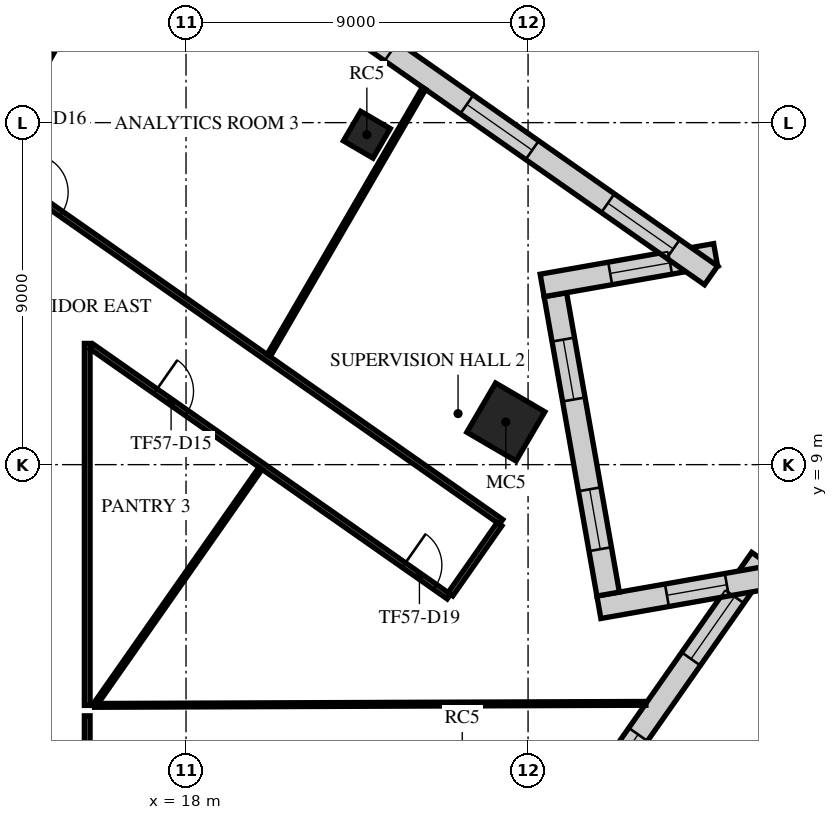
"""IFC4 building model, lengths in metres.
Left out: names, types, materials, properties, quantities, classifications, styles, units other than length and angle.
Written with IfcOpenShell. Run it as: python <this file> out.ifc"""

import sys

from ifc_helpers import new_model, si_unit, direction, frame, frame_2d, origin, origin_2d, place, context, subcontext, project, spatial, rectangle, extrude, element, fill, save


model = new_model("IFC4")
c1 = context("Model", 3, precision=1e-05, world=origin(), true_north=direction((0.0, 1.0)))
c2 = subcontext(c1, "Body", "Model", "MODEL_VIEW")
j1 = project(units=[si_unit("LENGTHUNIT", "METRE"), si_unit("PLANEANGLEUNIT", "RADIAN")], contexts=[c1])
p1 = place(None, origin())
s1 = spatial("IfcSite", under=j1, at=p1, CompositionType="ELEMENT")
p2 = place(p1, origin())
s2 = spatial("IfcBuilding", under=s1, at=p2, CompositionType="ELEMENT")
p3 = place(p2, frame((0.0, 0.0, 246.9)))
s3 = spatial("IfcBuildingStorey", under=s2, at=p3, CompositionType="ELEMENT", Elevation=246.9)
p4 = place(p3, frame((26.415, 10.122, 0.0), z_axis=(0.0, 0.0, 1.0), x_axis=(0.504643651291, 0.863327739165, 0.0)))
e1 = element("IfcColumn", 1, at=p4, inside=s3, PredefinedType="COLUMN", context=c2, shape_type="SweptSolid", body=[
    extrude(rectangle(XDim=1.5, YDim=1.5, at=origin_2d()), origin(), (0.0, 0.0, 1.0), 4.0),
])
p5 = place(p3, frame((22.758, 17.682, 0.0), z_axis=(0.0, 0.0, 1.0), x_axis=(0.504643651291, 0.863327739165, 0.0)))
e2 = element("IfcColumn", 2, at=p5, inside=s3, PredefinedType="COLUMN", context=c2, shape_type="SweptSolid", body=[
    extrude(rectangle(XDim=0.9, YDim=0.9, at=origin_2d()), origin(), (0.0, 0.0, 1.0), 4.0),
])
p6 = place(p3, frame((5.206, -33.362, 0.0), z_axis=(0.0, 0.0, 1.0), x_axis=(0.573577438409, 0.81915134264, 0.0)))
e3 = element("IfcWall", 3, at=p6, inside=s3, PredefinedType="STANDARD", context=c2, shape_type="SweptSolid", body=[
    extrude(rectangle(XDim=48.686, YDim=0.6, at=frame_2d((24.343, 0.0))), origin(), (0.0, 0.0, 1.0), 3.64),
])
p7 = place(p6, frame((1.213, 0.0, 0.9)))
e4 = element("IfcOpeningElement", 4, at=p7, cuts=e3, PredefinedType="OPENING", context=c2, shape_type="SweptSolid", body=[
    extrude(rectangle(XDim=2.0, YDim=2.1, at=frame_2d((1.0, 1.05))), frame((0.0, 0.31, 0.0), z_axis=(0.0, -1.0, 0.0), x_axis=(1.0, 0.0, 0.0)), (0.0, 0.0, 1.0), 0.62),
])
p8 = place(p6, frame((5.639, 0.0, 0.9)))
e5 = element("IfcOpeningElement", 5, at=p8, cuts=e3, PredefinedType="OPENING", context=c2, shape_type="SweptSolid", body=[
    extrude(rectangle(XDim=2.0, YDim=2.1, at=frame_2d((1.0, 1.05))), frame((0.0, 0.31, 0.0), z_axis=(0.0, -1.0, 0.0), x_axis=(1.0, 0.0, 0.0)), (0.0, 0.0, 1.0), 0.62),
])
p9 = place(p6, frame((10.065, 0.0, 0.9)))
e6 = element("IfcOpeningElement", 6, at=p9, cuts=e3, PredefinedType="OPENING", context=c2, shape_type="SweptSolid", body=[
    extrude(rectangle(XDim=2.0, YDim=2.1, at=frame_2d((1.0, 1.05))), frame((0.0, 0.31, 0.0), z_axis=(0.0, -1.0, 0.0), x_axis=(1.0, 0.0, 0.0)), (0.0, 0.0, 1.0), 0.62),
])
p10 = place(p6, frame((14.491, 0.0, 0.9)))
e7 = element("IfcOpeningElement", 7, at=p10, cuts=e3, PredefinedType="OPENING", context=c2, shape_type="SweptSolid", body=[
    extrude(rectangle(XDim=2.0, YDim=2.1, at=frame_2d((1.0, 1.05))), frame((0.0, 0.31, 0.0), z_axis=(0.0, -1.0, 0.0), x_axis=(1.0, 0.0, 0.0)), (0.0, 0.0, 1.0), 0.62),
])
p11 = place(p6, frame((18.917, 0.0, 0.9)))
e8 = element("IfcOpeningElement", 8, at=p11, cuts=e3, PredefinedType="OPENING", context=c2, shape_type="SweptSolid", body=[
    extrude(rectangle(XDim=2.0, YDim=2.1, at=frame_2d((1.0, 1.05))), frame((0.0, 0.31, 0.0), z_axis=(0.0, -1.0, 0.0), x_axis=(1.0, 0.0, 0.0)), (0.0, 0.0, 1.0), 0.62),
])
p12 = place(p6, frame((23.343, 0.0, 0.9)))
e9 = element("IfcOpeningElement", 9, at=p12, cuts=e3, PredefinedType="OPENING", context=c2, shape_type="SweptSolid", body=[
    extrude(rectangle(XDim=2.0, YDim=2.1, at=frame_2d((1.0, 1.05))), frame((0.0, 0.31, 0.0), z_axis=(0.0, -1.0, 0.0), x_axis=(1.0, 0.0, 0.0)), (0.0, 0.0, 1.0), 0.62),
])
p13 = place(p6, frame((27.769, 0.0, 0.9)))
e10 = element("IfcOpeningElement", 10, at=p13, cuts=e3, PredefinedType="OPENING", context=c2, shape_type="SweptSolid", body=[
    extrude(rectangle(XDim=2.0, YDim=2.1, at=frame_2d((1.0, 1.05))), frame((0.0, 0.31, 0.0), z_axis=(0.0, -1.0, 0.0), x_axis=(1.0, 0.0, 0.0)), (0.0, 0.0, 1.0), 0.62),
])
p14 = place(p6, frame((32.195, 0.0, 0.9)))
e11 = element("IfcOpeningElement", 11, at=p14, cuts=e3, PredefinedType="OPENING", context=c2, shape_type="SweptSolid", body=[
    extrude(rectangle(XDim=2.0, YDim=2.1, at=frame_2d((1.0, 1.05))), frame((0.0, 0.31, 0.0), z_axis=(0.0, -1.0, 0.0), x_axis=(1.0, 0.0, 0.0)), (0.0, 0.0, 1.0), 0.62),
])
p15 = place(p6, frame((36.621, 0.0, 0.9)))
e12 = element("IfcOpeningElement", 12, at=p15, cuts=e3, PredefinedType="OPENING", context=c2, shape_type="SweptSolid", body=[
    extrude(rectangle(XDim=2.0, YDim=2.1, at=frame_2d((1.0, 1.05))), frame((0.0, 0.31, 0.0), z_axis=(0.0, -1.0, 0.0), x_axis=(1.0, 0.0, 0.0)), (0.0, 0.0, 1.0), 0.62),
])
p16 = place(p6, frame((41.047, 0.0, 0.9)))
e13 = element("IfcOpeningElement", 13, at=p16, cuts=e3, PredefinedType="OPENING", context=c2, shape_type="SweptSolid", body=[
    extrude(rectangle(XDim=2.0, YDim=2.1, at=frame_2d((1.0, 1.05))), frame((0.0, 0.31, 0.0), z_axis=(0.0, -1.0, 0.0), x_axis=(1.0, 0.0, 0.0)), (0.0, 0.0, 1.0), 0.62),
])
p17 = place(p6, frame((45.473, 0.0, 0.9)))
e14 = element("IfcOpeningElement", 14, at=p17, cuts=e3, PredefinedType="OPENING", context=c2, shape_type="SweptSolid", body=[
    extrude(rectangle(XDim=2.0, YDim=2.1, at=frame_2d((1.0, 1.05))), frame((0.0, 0.31, 0.0), z_axis=(0.0, -1.0, 0.0), x_axis=(1.0, 0.0, 0.0)), (0.0, 0.0, 1.0), 0.62),
])
p18 = place(p3, frame((33.429, 6.052, 0.0), z_axis=(0.0, 0.0, 1.0), x_axis=(-0.984808997794, -0.173641118013, 0.0)))
e15 = element("IfcWall", 15, at=p18, inside=s3, PredefinedType="STANDARD", context=c2, shape_type="SweptSolid", body=[
    extrude(rectangle(XDim=4.635, YDim=0.6, at=frame_2d((2.318, 0.0))), origin(), (0.0, 0.0, 1.0), 3.64),
])
p19 = place(p18, frame((1.218, 0.0, 0.9)))
e16 = element("IfcOpeningElement", 16, at=p19, cuts=e15, PredefinedType="OPENING", context=c2, shape_type="SweptSolid", body=[
    extrude(rectangle(XDim=1.6, YDim=2.1, at=frame_2d((0.8, 1.05))), frame((0.0, 0.31, 0.0), z_axis=(0.0, -1.0, 0.0), x_axis=(1.0, 0.0, 0.0)), (0.0, 0.0, 1.0), 0.62),
])
p20 = place(p3, frame((29.107, 5.594, 0.0), z_axis=(0.0, 0.0, 1.0), x_axis=(-0.173640837858, 0.98480904719, 0.0)))
e17 = element("IfcWall", 17, at=p20, inside=s3, PredefinedType="STANDARD", context=c2, shape_type="SweptSolid", body=[
    extrude(rectangle(XDim=8.0, YDim=0.6, at=frame_2d((4.0, 0.0))), origin(), (0.0, 0.0, 1.0), 3.64),
])
p21 = place(p20, frame((1.2, 0.0, 0.9)))
e18 = element("IfcOpeningElement", 18, at=p21, cuts=e17, PredefinedType="OPENING", context=c2, shape_type="SweptSolid", body=[
    extrude(rectangle(XDim=1.6, YDim=2.1, at=frame_2d((0.8, 1.05))), frame((0.0, 0.31, 0.0), z_axis=(0.0, -1.0, 0.0), x_axis=(1.0, 0.0, 0.0)), (0.0, 0.0, 1.0), 0.62),
])
p22 = place(p20, frame((5.2, 0.0, 0.9)))
e19 = element("IfcOpeningElement", 19, at=p22, cuts=e17, PredefinedType="OPENING", context=c2, shape_type="SweptSolid", body=[
    extrude(rectangle(XDim=1.6, YDim=2.1, at=frame_2d((0.8, 1.05))), frame((0.0, 0.31, 0.0), z_axis=(0.0, -1.0, 0.0), x_axis=(1.0, 0.0, 0.0)), (0.0, 0.0, 1.0), 0.62),
])
p23 = place(p3, frame((27.37, 13.716, 0.0), z_axis=(0.0, 0.0, 1.0), x_axis=(0.984799990421, 0.173692195754, 0.0)))
e20 = element("IfcWall", 20, at=p23, inside=s3, PredefinedType="STANDARD", context=c2, shape_type="SweptSolid", body=[
    extrude(rectangle(XDim=4.636, YDim=0.6, at=frame_2d((2.318, 0.0))), origin(), (0.0, 0.0, 1.0), 3.64),
])
p24 = place(p23, frame((1.818, 0.0, 0.9)))
e21 = element("IfcOpeningElement", 21, at=p24, cuts=e20, PredefinedType="OPENING", context=c2, shape_type="SweptSolid", body=[
    extrude(rectangle(XDim=1.6, YDim=2.1, at=frame_2d((0.8, 1.05))), frame((0.0, 0.31, 0.0), z_axis=(0.0, -1.0, 0.0), x_axis=(1.0, 0.0, 0.0)), (0.0, 0.0, 1.0), 0.62),
])
p25 = place(p3, frame((31.815, 13.98, 0.0), z_axis=(0.0, 0.0, 1.0), x_axis=(-0.819152162902, 0.573576266955, 0.0)))
e22 = element("IfcWall", 22, at=p25, inside=s3, PredefinedType="STANDARD", context=c2, shape_type="SweptSolid", body=[
    extrude(rectangle(XDim=36.243, YDim=0.6, at=frame_2d((18.122, 0.0))), origin(), (0.0, 0.0, 1.0), 3.64),
])
p26 = place(p25, frame((1.215, 0.0, 0.9)))
e23 = element("IfcOpeningElement", 23, at=p26, cuts=e22, PredefinedType="OPENING", context=c2, shape_type="SweptSolid", body=[
    extrude(rectangle(XDim=2.1, YDim=2.1, at=frame_2d((1.05, 1.05))), frame((0.0, 0.31, 0.0), z_axis=(0.0, -1.0, 0.0), x_axis=(1.0, 0.0, 0.0)), (0.0, 0.0, 1.0), 0.62),
])
p27 = place(p25, frame((5.746, 0.0, 0.9)))
e24 = element("IfcOpeningElement", 24, at=p27, cuts=e22, PredefinedType="OPENING", context=c2, shape_type="SweptSolid", body=[
    extrude(rectangle(XDim=2.1, YDim=2.1, at=frame_2d((1.05, 1.05))), frame((0.0, 0.31, 0.0), z_axis=(0.0, -1.0, 0.0), x_axis=(1.0, 0.0, 0.0)), (0.0, 0.0, 1.0), 0.62),
])
p28 = place(p25, frame((10.276, 0.0, 0.9)))
e25 = element("IfcOpeningElement", 25, at=p28, cuts=e22, PredefinedType="OPENING", context=c2, shape_type="SweptSolid", body=[
    extrude(rectangle(XDim=2.1, YDim=2.1, at=frame_2d((1.05, 1.05))), frame((0.0, 0.31, 0.0), z_axis=(0.0, -1.0, 0.0), x_axis=(1.0, 0.0, 0.0)), (0.0, 0.0, 1.0), 0.62),
])
p29 = place(p25, frame((14.806, 0.0, 0.9)))
e26 = element("IfcOpeningElement", 26, at=p29, cuts=e22, PredefinedType="OPENING", context=c2, shape_type="SweptSolid", body=[
    extrude(rectangle(XDim=2.1, YDim=2.1, at=frame_2d((1.05, 1.05))), frame((0.0, 0.31, 0.0), z_axis=(0.0, -1.0, 0.0), x_axis=(1.0, 0.0, 0.0)), (0.0, 0.0, 1.0), 0.62),
])
p30 = place(p25, frame((19.337, 0.0, 0.9)))
e27 = element("IfcOpeningElement", 27, at=p30, cuts=e22, PredefinedType="OPENING", context=c2, shape_type="SweptSolid", body=[
    extrude(rectangle(XDim=2.1, YDim=2.1, at=frame_2d((1.05, 1.05))), frame((0.0, 0.31, 0.0), z_axis=(0.0, -1.0, 0.0), x_axis=(1.0, 0.0, 0.0)), (0.0, 0.0, 1.0), 0.62),
])
p31 = place(p25, frame((23.867, 0.0, 0.9)))
e28 = element("IfcOpeningElement", 28, at=p31, cuts=e22, PredefinedType="OPENING", context=c2, shape_type="SweptSolid", body=[
    extrude(rectangle(XDim=2.1, YDim=2.1, at=frame_2d((1.05, 1.05))), frame((0.0, 0.31, 0.0), z_axis=(0.0, -1.0, 0.0), x_axis=(1.0, 0.0, 0.0)), (0.0, 0.0, 1.0), 0.62),
])
p32 = place(p25, frame((28.398, 0.0, 0.9)))
e29 = element("IfcOpeningElement", 29, at=p32, cuts=e22, PredefinedType="OPENING", context=c2, shape_type="SweptSolid", body=[
    extrude(rectangle(XDim=2.1, YDim=2.1, at=frame_2d((1.05, 1.05))), frame((0.0, 0.31, 0.0), z_axis=(0.0, -1.0, 0.0), x_axis=(1.0, 0.0, 0.0)), (0.0, 0.0, 1.0), 0.62),
])
p33 = place(p25, frame((32.928, 0.0, 0.9)))
e30 = element("IfcOpeningElement", 30, at=p33, cuts=e22, PredefinedType="OPENING", context=c2, shape_type="SweptSolid", body=[
    extrude(rectangle(XDim=2.1, YDim=2.1, at=frame_2d((1.05, 1.05))), frame((0.0, 0.31, 0.0), z_axis=(0.0, -1.0, 0.0), x_axis=(1.0, 0.0, 0.0)), (0.0, 0.0, 1.0), 0.62),
])
p34 = place(p3, frame((-1.89, 27.226, 0.0), z_axis=(0.0, 0.0, 1.0), x_axis=(0.819163235761, -0.573560452941, 0.0)))
e31 = element("IfcWall", 31, at=p34, inside=s3, PredefinedType="PARTITIONING", context=c2, shape_type="SweptSolid", body=[
    extrude(rectangle(XDim=34.403, YDim=0.15, at=frame_2d((17.202, 0.0))), origin(), (0.0, 0.0, 1.0), 3.24),
])
p35 = place(p34, frame((7.427, 0.0, 0.0)))
e32 = element("IfcOpeningElement", 32, at=p35, cuts=e31, PredefinedType="OPENING", context=c2, shape_type="SweptSolid", body=[
    extrude(rectangle(XDim=1.0, YDim=2.1, at=frame_2d((0.5, 1.05))), frame((0.0, 0.085, 0.0), z_axis=(0.0, -1.0, 0.0), x_axis=(1.0, 0.0, 0.0)), (0.0, 0.0, 1.0), 0.17),
])
p36 = place(p34, frame((15.173, 0.0, 0.0)))
e33 = element("IfcOpeningElement", 33, at=p36, cuts=e31, PredefinedType="OPENING", context=c2, shape_type="SweptSolid", body=[
    extrude(rectangle(XDim=1.0, YDim=2.1, at=frame_2d((0.5, 1.05))), frame((0.0, 0.085, 0.0), z_axis=(0.0, -1.0, 0.0), x_axis=(1.0, 0.0, 0.0)), (0.0, 0.0, 1.0), 0.17),
])
p37 = place(p34, frame((19.273, 0.0, 0.0)))
e34 = element("IfcOpeningElement", 34, at=p37, cuts=e31, PredefinedType="OPENING", context=c2, shape_type="SweptSolid", body=[
    extrude(rectangle(XDim=1.0, YDim=2.1, at=frame_2d((0.5, 1.05))), frame((0.0, 0.085, 0.0), z_axis=(0.0, -1.0, 0.0), x_axis=(1.0, 0.0, 0.0)), (0.0, 0.0, 1.0), 0.17),
])
p38 = place(p3, frame((15.4, -15.325, 0.0), z_axis=(0.0, 0.0, 1.0), x_axis=(0.0, 1.0, 0.0)))
e35 = element("IfcWall", 35, at=p38, inside=s3, PredefinedType="PARTITIONING", context=c2, shape_type="SweptSolid", body=[
    extrude(rectangle(XDim=17.715, YDim=0.15, at=frame_2d((8.857, 0.0))), origin(), (0.0, 0.0, 1.0), 3.24),
])
p39 = place(p38, frame((7.812, 0.0, 0.0)))
e36 = element("IfcOpeningElement", 36, at=p39, cuts=e35, PredefinedType="OPENING", context=c2, shape_type="SweptSolid", body=[
    extrude(rectangle(XDim=1.0, YDim=2.1, at=frame_2d((0.5, 1.05))), frame((0.0, 0.085, 0.0), z_axis=(0.0, -1.0, 0.0), x_axis=(1.0, 0.0, 0.0)), (0.0, 0.0, 1.0), 0.17),
])
p40 = place(p38, frame((15.123, 0.0, 0.0)))
e37 = element("IfcOpeningElement", 37, at=p40, cuts=e35, PredefinedType="OPENING", context=c2, shape_type="SweptSolid", body=[
    extrude(rectangle(XDim=1.0, YDim=2.1, at=frame_2d((0.5, 1.05))), frame((0.0, 0.085, 0.0), z_axis=(0.0, -1.0, 0.0), x_axis=(1.0, 0.0, 0.0)), (0.0, 0.0, 1.0), 0.17),
])
p41 = place(p3, frame((15.4, 2.664, 0.0), z_axis=(0.0, 0.0, 1.0), x_axis=(0.0, 1.0, 0.0)))
e38 = element("IfcWall", 38, at=p41, inside=s3, PredefinedType="PARTITIONING", context=c2, shape_type="SweptSolid", body=[
    extrude(rectangle(XDim=9.526, YDim=0.15, at=frame_2d((4.763, 0.0))), origin(), (0.0, 0.0, 1.0), 3.24),
])
p42 = place(p3, frame((15.518, 12.107, 0.0), z_axis=(0.0, 0.0, 1.0), x_axis=(0.819171924474, -0.573548043457, 0.0)))
e39 = element("IfcWall", 39, at=p42, inside=s3, PredefinedType="PARTITIONING", context=c2, shape_type="SweptSolid", body=[
    extrude(rectangle(XDim=11.471, YDim=0.15, at=frame_2d((5.736, 0.0))), origin(), (0.0, 0.0, 1.0), 3.24),
])
p43 = place(p42, frame((2.05, 0.0, 0.0)))
e40 = element("IfcOpeningElement", 40, at=p43, cuts=e39, PredefinedType="OPENING", context=c2, shape_type="SweptSolid", body=[
    extrude(rectangle(XDim=1.0, YDim=2.1, at=frame_2d((0.5, 1.05))), frame((0.0, 0.085, 0.0), z_axis=(0.0, -1.0, 0.0), x_axis=(1.0, 0.0, 0.0)), (0.0, 0.0, 1.0), 0.17),
])
p44 = place(p42, frame((10.027, 0.0, 0.0)))
e41 = element("IfcOpeningElement", 41, at=p44, cuts=e39, PredefinedType="OPENING", context=c2, shape_type="SweptSolid", body=[
    extrude(rectangle(XDim=1.0, YDim=2.1, at=frame_2d((0.5, 1.05))), frame((0.0, 0.085, 0.0), z_axis=(0.0, -1.0, 0.0), x_axis=(1.0, 0.0, 0.0)), (0.0, 0.0, 1.0), 0.17),
])
p45 = place(p3, frame((24.958, 5.589, 0.0), z_axis=(0.0, 0.0, 1.0), x_axis=(0.573680754751, 0.819078989859, 0.0)))
e42 = element("IfcWall", 42, at=p45, inside=s3, PredefinedType="PARTITIONING", context=c2, shape_type="SweptSolid", body=[
    extrude(rectangle(XDim=2.25, YDim=0.15, at=frame_2d((1.125, 0.0))), origin(), (0.0, 0.0, 1.0), 3.24),
])
p46 = place(p3, frame((12.876, 16.985, 0.0), z_axis=(0.0, 0.0, 1.0), x_axis=(0.487744732035, 0.872986297929, 0.0)))
e43 = element("IfcWall", 43, at=p46, inside=s3, PredefinedType="PARTITIONING", context=c2, shape_type="SweptSolid", body=[
    extrude(rectangle(XDim=8.141, YDim=0.1, at=frame_2d((4.07, 0.0))), origin(), (0.0, 0.0, 1.0), 3.24),
])
p47 = place(p3, frame((15.593, 2.665, 0.0), z_axis=(0.0, 0.0, 1.0), x_axis=(0.999993270933, 0.003668526741, 0.0)))
e44 = element("IfcWall", 44, at=p47, inside=s3, PredefinedType="PARTITIONING", context=c2, shape_type="SweptSolid", body=[
    extrude(rectangle(XDim=14.508, YDim=0.1, at=frame_2d((7.254, 0.0))), origin(), (0.0, 0.0, 1.0), 3.64),
])
p48 = place(p3, frame((15.648, 2.744, 0.0), z_axis=(0.0, 0.0, 1.0), x_axis=(0.57357562998, 0.819152608915, 0.0)))
e45 = element("IfcWall", 45, at=p48, inside=s3, PredefinedType="PARTITIONING", context=c2, shape_type="SweptSolid", body=[
    extrude(rectangle(XDim=7.521, YDim=0.1, at=frame_2d((3.76, 0.0))), origin(), (0.0, 0.0, 1.0), 3.24),
])
p49 = place(p3, frame((20.177, 11.873, 0.0), z_axis=(0.0, 0.0, 1.0), x_axis=(0.502475319919, 0.864591552626, 0.0)))
e46 = element("IfcWall", 46, at=p49, inside=s3, PredefinedType="PARTITIONING", context=c2, shape_type="SweptSolid", body=[
    extrude(rectangle(XDim=8.128, YDim=0.1, at=frame_2d((4.064, 0.0))), origin(), (0.0, 0.0, 1.0), 3.24),
])
p50 = place(p16, origin())
e47 = element("IfcWindow", 47, at=p50, inside=s3, PartitioningType="SINGLE_PANEL", PredefinedType="WINDOW", context=c2, shape_type="SweptSolid", body=[
    extrude(rectangle(XDim=2.0, YDim=2.1, at=frame_2d((1.0, 1.05))), frame((0.0, 0.03, 0.0), z_axis=(0.0, -1.0, 0.0), x_axis=(1.0, 0.0, 0.0)), (0.0, 0.0, 1.0), 0.06),
])
fill(e13, e47)
p51 = place(p17, origin())
e48 = element("IfcWindow", 48, at=p51, inside=s3, PartitioningType="SINGLE_PANEL", PredefinedType="WINDOW", context=c2, shape_type="SweptSolid", body=[
    extrude(rectangle(XDim=2.0, YDim=2.1, at=frame_2d((1.0, 1.05))), frame((0.0, 0.03, 0.0), z_axis=(0.0, -1.0, 0.0), x_axis=(1.0, 0.0, 0.0)), (0.0, 0.0, 1.0), 0.06),
])
fill(e14, e48)
p52 = place(p19, origin())
e49 = element("IfcWindow", 49, at=p52, inside=s3, PartitioningType="SINGLE_PANEL", PredefinedType="WINDOW", context=c2, shape_type="SweptSolid", body=[
    extrude(rectangle(XDim=1.6, YDim=2.1, at=frame_2d((0.8, 1.05))), frame((0.0, 0.03, 0.0), z_axis=(0.0, -1.0, 0.0), x_axis=(1.0, 0.0, 0.0)), (0.0, 0.0, 1.0), 0.06),
])
fill(e16, e49)
p53 = place(p21, origin())
e50 = element("IfcWindow", 50, at=p53, inside=s3, PartitioningType="SINGLE_PANEL", PredefinedType="WINDOW", context=c2, shape_type="SweptSolid", body=[
    extrude(rectangle(XDim=1.6, YDim=2.1, at=frame_2d((0.8, 1.05))), frame((0.0, 0.03, 0.0), z_axis=(0.0, -1.0, 0.0), x_axis=(1.0, 0.0, 0.0)), (0.0, 0.0, 1.0), 0.06),
])
fill(e18, e50)
p54 = place(p22, origin())
e51 = element("IfcWindow", 51, at=p54, inside=s3, PartitioningType="SINGLE_PANEL", PredefinedType="WINDOW", context=c2, shape_type="SweptSolid", body=[
    extrude(rectangle(XDim=1.6, YDim=2.1, at=frame_2d((0.8, 1.05))), frame((0.0, 0.03, 0.0), z_axis=(0.0, -1.0, 0.0), x_axis=(1.0, 0.0, 0.0)), (0.0, 0.0, 1.0), 0.06),
])
fill(e19, e51)
p55 = place(p24, origin())
e52 = element("IfcWindow", 52, at=p55, inside=s3, PartitioningType="SINGLE_PANEL", PredefinedType="WINDOW", context=c2, shape_type="SweptSolid", body=[
    extrude(rectangle(XDim=1.6, YDim=2.1, at=frame_2d((0.8, 1.05))), frame((0.0, 0.03, 0.0), z_axis=(0.0, -1.0, 0.0), x_axis=(1.0, 0.0, 0.0)), (0.0, 0.0, 1.0), 0.06),
])
fill(e21, e52)
p56 = place(p26, origin())
e53 = element("IfcWindow", 53, at=p56, inside=s3, PartitioningType="SINGLE_PANEL", PredefinedType="WINDOW", context=c2, shape_type="SweptSolid", body=[
    extrude(rectangle(XDim=2.1, YDim=2.1, at=frame_2d((1.05, 1.05))), frame((0.0, 0.03, 0.0), z_axis=(0.0, -1.0, 0.0), x_axis=(1.0, 0.0, 0.0)), (0.0, 0.0, 1.0), 0.06),
])
fill(e23, e53)
p57 = place(p27, origin())
e54 = element("IfcWindow", 54, at=p57, inside=s3, PartitioningType="SINGLE_PANEL", PredefinedType="WINDOW", context=c2, shape_type="SweptSolid", body=[
    extrude(rectangle(XDim=2.1, YDim=2.1, at=frame_2d((1.05, 1.05))), frame((0.0, 0.03, 0.0), z_axis=(0.0, -1.0, 0.0), x_axis=(1.0, 0.0, 0.0)), (0.0, 0.0, 1.0), 0.06),
])
fill(e24, e54)
p58 = place(p28, origin())
e55 = element("IfcWindow", 55, at=p58, inside=s3, PartitioningType="SINGLE_PANEL", PredefinedType="WINDOW", context=c2, shape_type="SweptSolid", body=[
    extrude(rectangle(XDim=2.1, YDim=2.1, at=frame_2d((1.05, 1.05))), frame((0.0, 0.03, 0.0), z_axis=(0.0, -1.0, 0.0), x_axis=(1.0, 0.0, 0.0)), (0.0, 0.0, 1.0), 0.06),
])
fill(e25, e55)
p59 = place(p43, frame((1.0, 0.0, 0.0), z_axis=(0.0, 0.0, 1.0), x_axis=(-1.0, 0.0, 0.0)))
e56 = element("IfcDoor", 56, at=p59, inside=s3, OperationType="SINGLE_SWING_LEFT", PredefinedType="DOOR", context=c2, shape_type="SweptSolid", body=[
    extrude(rectangle(XDim=1.0, YDim=2.1, at=frame_2d((0.5, 1.05))), frame((0.0, 0.025, 0.0), z_axis=(0.0, -1.0, 0.0), x_axis=(1.0, 0.0, 0.0)), (0.0, 0.0, 1.0), 0.05),
])
fill(e40, e56)
p60 = place(p37, origin())
e57 = element("IfcDoor", 57, at=p60, inside=s3, OperationType="SINGLE_SWING_LEFT", PredefinedType="DOOR", context=c2, shape_type="SweptSolid", body=[
    extrude(rectangle(XDim=1.0, YDim=2.1, at=frame_2d((0.5, 1.05))), frame((0.0, 0.025, 0.0), z_axis=(0.0, -1.0, 0.0), x_axis=(1.0, 0.0, 0.0)), (0.0, 0.0, 1.0), 0.05),
])
fill(e34, e57)
p61 = place(p44, frame((1.0, 0.0, 0.0), z_axis=(0.0, 0.0, 1.0), x_axis=(-1.0, 0.0, 0.0)))
e58 = element("IfcDoor", 58, at=p61, inside=s3, OperationType="SINGLE_SWING_LEFT", PredefinedType="DOOR", context=c2, shape_type="SweptSolid", body=[
    extrude(rectangle(XDim=1.0, YDim=2.1, at=frame_2d((0.5, 1.05))), frame((0.0, 0.025, 0.0), z_axis=(0.0, -1.0, 0.0), x_axis=(1.0, 0.0, 0.0)), (0.0, 0.0, 1.0), 0.05),
])
fill(e41, e58)
save(model, sys.argv[1])
